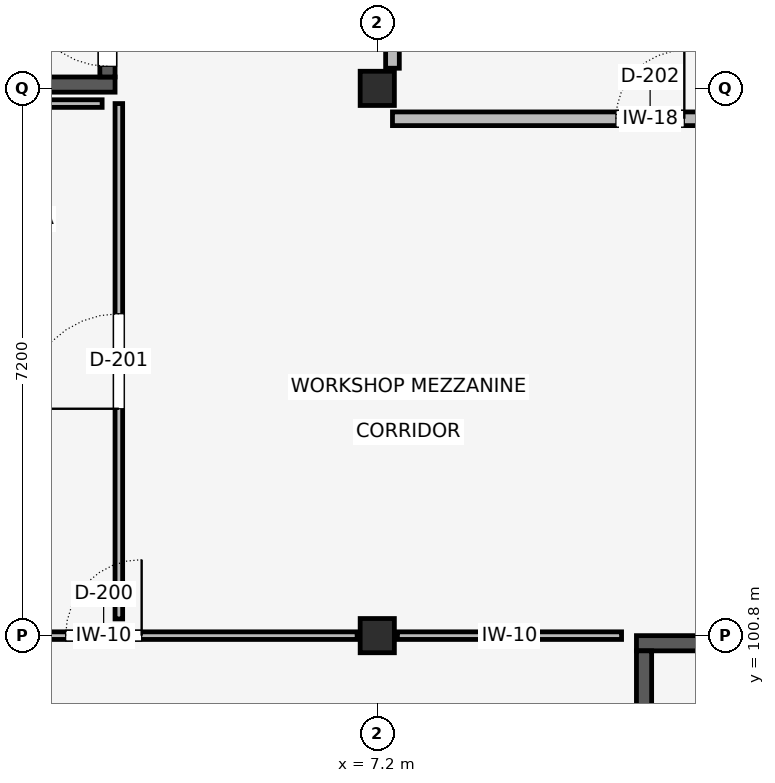
"""IFC4 building model, lengths in metres.
Left out: names, types, materials, properties, quantities, classifications, styles, units other than length and angle.
Written with IfcOpenShell. Run it as: python <this file> out.ifc"""

import sys

from ifc_helpers import new_model, si_unit, direction, frame, frame_2d, origin, origin_2d, place, context, subcontext, project, spatial, rectangle, extrude, element, fill, save


model = new_model("IFC4")
c1 = context("Model", 3, precision=1e-05, world=origin(), true_north=direction((0.0, 1.0)))
c2 = subcontext(c1, "Body", "Model", "MODEL_VIEW")
j1 = project(units=[si_unit("LENGTHUNIT", "METRE"), si_unit("PLANEANGLEUNIT", "RADIAN")], contexts=[c1])
p1 = place(None, origin())
s1 = spatial("IfcSite", under=j1, at=p1, CompositionType="ELEMENT")
p2 = place(p1, origin())
s2 = spatial("IfcBuilding", under=s1, at=p2, CompositionType="ELEMENT")
p3 = place(p2, frame((0.0, 0.0, 5.4)))
s3 = spatial("IfcBuildingStorey", under=s2, at=p3, CompositionType="ELEMENT", Elevation=5.4)
for number, where, z_axis, x_axis in (
    (1, (7.2, 100.8, 0.0), (0.0, 0.0, 1.0), (1.0, 0.0, 0.0)),
    (2, (7.2, 108.0, 0.0), (0.0, 0.0, 1.0), (1.0, 0.0, 0.0)),
):
    element("IfcColumn", number, at=place(p3, frame(where, z_axis=z_axis, x_axis=x_axis)), inside=s3, PredefinedType="COLUMN", context=c2, shape_type="SweptSolid", body=[
        extrude(rectangle(XDim=0.45, YDim=0.45, at=origin_2d()), origin(), (0.0, 0.0, 1.0), 4.2),
    ])
p4 = place(p3, frame((0.225, 108.05, 0.0), z_axis=(0.0, 0.0, 1.0), x_axis=(1.0, 0.0, 0.0)))
e3 = element("IfcWall", 3, at=p4, inside=s3, PredefinedType="SHEAR", context=c2, shape_type="SweptSolid", body=[
    extrude(rectangle(XDim=3.525, YDim=0.2, at=frame_2d((1.762, 0.0))), origin(), (0.0, 0.0, 1.0), 3.95),
])
p5 = place(p3, frame((3.65, 108.15, 0.0), z_axis=(0.0, 0.0, 1.0), x_axis=(0.0, 1.0, 0.0)))
e4 = element("IfcWall", 4, at=p5, inside=s3, PredefinedType="SHEAR", context=c2, shape_type="SweptSolid", body=[
    extrude(rectangle(XDim=6.56, YDim=0.2, at=frame_2d((3.28, 0.0))), origin(), (0.0, 0.0, 1.0), 3.95),
])
p6 = place(p5, frame((0.14, 0.0, 0.0)))
e5 = element("IfcOpeningElement", 5, at=p6, cuts=e4, PredefinedType="OPENING", context=c2, shape_type="SweptSolid", body=[
    extrude(rectangle(XDim=1.1, YDim=2.15, at=frame_2d((0.55, 1.075))), frame((0.0, 0.112, 0.0), z_axis=(0.0, -1.0, 0.0), x_axis=(1.0, 0.0, 0.0)), (0.0, 0.0, 1.0), 0.224),
])
p7 = place(p3, frame((10.61, 100.7, 0.0), z_axis=(0.0, 0.0, 1.0), x_axis=(1.0, 0.0, 0.0)))
e6 = element("IfcWall", 6, at=p7, inside=s3, PredefinedType="SHEAR", context=c2, shape_type="SweptSolid", body=[
    extrude(rectangle(XDim=3.565, YDim=0.2, at=frame_2d((1.782, 0.0))), origin(), (0.0, 0.0, 1.0), 3.95),
])
p8 = place(p7, frame((1.232, 0.0, 0.0)))
e7 = element("IfcOpeningElement", 7, at=p8, cuts=e6, PredefinedType="OPENING", context=c2, shape_type="SweptSolid", body=[
    extrude(rectangle(XDim=1.1, YDim=2.15, at=frame_2d((0.55, 1.075))), frame((0.0, 0.112, 0.0), z_axis=(0.0, -1.0, 0.0), x_axis=(1.0, 0.0, 0.0)), (0.0, 0.0, 1.0), 0.224),
])
p9 = place(p3, frame((10.71, 94.04, 0.0), z_axis=(0.0, 0.0, 1.0), x_axis=(0.0, 1.0, 0.0)))
e8 = element("IfcWall", 8, at=p9, inside=s3, PredefinedType="SHEAR", context=c2, shape_type="SweptSolid", body=[
    extrude(rectangle(XDim=6.56, YDim=0.2, at=frame_2d((3.28, 0.0))), origin(), (0.0, 0.0, 1.0), 3.95),
])
p10 = place(p3, frame((0.265, 100.8, 0.0), z_axis=(0.0, 0.0, 1.0), x_axis=(1.0, 0.0, 0.0)))
e9 = element("IfcWall", 9, at=p10, inside=s3, PredefinedType="PARTITIONING", context=c2, shape_type="SweptSolid", body=[
    extrude(rectangle(XDim=6.67, YDim=0.1, at=frame_2d((3.335, 0.0))), origin(), (0.0, 0.0, 1.0), 3.773),
])
p11 = place(p10, frame((2.835, 0.0, 0.0)))
e10 = element("IfcOpeningElement", 10, at=p11, cuts=e9, PredefinedType="OPENING", context=c2, shape_type="SweptSolid", body=[
    extrude(rectangle(XDim=1.0, YDim=2.15, at=frame_2d((0.5, 1.075))), frame((0.0, 0.062, 0.0), z_axis=(0.0, -1.0, 0.0), x_axis=(1.0, 0.0, 0.0)), (0.0, 0.0, 1.0), 0.124),
])
p12 = place(p3, frame((7.465, 100.8, 0.0), z_axis=(0.0, 0.0, 1.0), x_axis=(1.0, 0.0, 0.0)))
e11 = element("IfcWall", 11, at=p12, inside=s3, PredefinedType="PARTITIONING", context=c2, shape_type="SweptSolid", body=[
    extrude(rectangle(XDim=2.949, YDim=0.1, at=frame_2d((1.475, 0.0))), origin(), (0.0, 0.0, 1.0), 3.92),
])
p13 = place(p3, frame((3.8, 101.02, 0.0), z_axis=(0.0, 0.0, 1.0), x_axis=(0.0, 1.0, 0.0)))
e12 = element("IfcWall", 12, at=p13, inside=s3, PredefinedType="PARTITIONING", context=c2, shape_type="SweptSolid", body=[
    extrude(rectangle(XDim=6.78, YDim=0.1, at=frame_2d((3.39, 0.0))), origin(), (0.0, 0.0, 1.0), 3.92),
])
p14 = place(p13, frame((2.765, 0.0, 0.0)))
e13 = element("IfcOpeningElement", 13, at=p14, cuts=e12, PredefinedType="OPENING", context=c2, shape_type="SweptSolid", body=[
    extrude(rectangle(XDim=1.25, YDim=2.15, at=frame_2d((0.625, 1.075))), frame((0.0, 0.062, 0.0), z_axis=(0.0, -1.0, 0.0), x_axis=(1.0, 0.0, 0.0)), (0.0, 0.0, 1.0), 0.124),
])
p15 = place(p3, frame((0.265, 107.8, 0.0), z_axis=(0.0, 0.0, 1.0), x_axis=(1.0, 0.0, 0.0)))
e14 = element("IfcWall", 14, at=p15, inside=s3, PredefinedType="PARTITIONING", context=c2, shape_type="SweptSolid", body=[
    extrude(rectangle(XDim=3.315, YDim=0.1, at=frame_2d((1.658, 0.0))), origin(), (0.0, 0.0, 1.0), 3.92),
])
p16 = place(p3, frame((7.4, 107.6, 0.0), z_axis=(0.0, 0.0, 1.0), x_axis=(1.0, 0.0, 0.0)))
e15 = element("IfcWall", 15, at=p16, inside=s3, PredefinedType="PLUMBINGWALL", context=c2, shape_type="SweptSolid", body=[
    extrude(rectangle(XDim=6.78, YDim=0.18, at=frame_2d((3.39, 0.0))), origin(), (0.0, 0.0, 1.0), 3.92),
])
p17 = place(p16, frame((2.94, 0.0, 0.0)))
e16 = element("IfcOpeningElement", 16, at=p17, cuts=e15, PredefinedType="OPENING", context=c2, shape_type="SweptSolid", body=[
    extrude(rectangle(XDim=0.9, YDim=2.1, at=frame_2d((0.45, 1.05))), frame((0.0, 0.102, 0.0), z_axis=(0.0, -1.0, 0.0), x_axis=(1.0, 0.0, 0.0)), (0.0, 0.0, 1.0), 0.204),
])
p18 = place(p3, frame((7.4, 108.265, 0.0), z_axis=(0.0, 0.0, 1.0), x_axis=(0.0, 1.0, 0.0)))
e17 = element("IfcWall", 17, at=p18, inside=s3, PredefinedType="PLUMBINGWALL", context=c2, shape_type="SweptSolid", body=[
    extrude(rectangle(XDim=6.67, YDim=0.18, at=frame_2d((3.335, 0.0))), origin(), (0.0, 0.0, 1.0), 3.771),
])
p19 = place(p6, origin())
e18 = element("IfcDoor", 18, at=p19, inside=s3, OperationType="SINGLE_SWING_RIGHT", PredefinedType="DOOR", context=c2, shape_type="SweptSolid", body=[
    extrude(rectangle(XDim=1.1, YDim=2.15, at=frame_2d((0.55, 1.075))), frame((0.0, 0.025, 0.0), z_axis=(0.0, -1.0, 0.0), x_axis=(1.0, 0.0, 0.0)), (0.0, 0.0, 1.0), 0.05),
])
fill(e5, e18)
p20 = place(p11, origin())
e19 = element("IfcDoor", 19, at=p20, inside=s3, OperationType="SINGLE_SWING_RIGHT", PredefinedType="DOOR", context=c2, shape_type="SweptSolid", body=[
    extrude(rectangle(XDim=1.0, YDim=2.15, at=frame_2d((0.5, 1.075))), frame((0.0, 0.025, 0.0), z_axis=(0.0, -1.0, 0.0), x_axis=(1.0, 0.0, 0.0)), (0.0, 0.0, 1.0), 0.05),
])
fill(e10, e19)
p21 = place(p14, origin())
e20 = element("IfcDoor", 20, at=p21, inside=s3, OperationType="SINGLE_SWING_LEFT", PredefinedType="DOOR", context=c2, shape_type="SweptSolid", body=[
    extrude(rectangle(XDim=1.25, YDim=2.15, at=frame_2d((0.625, 1.075))), frame((0.0, 0.025, 0.0), z_axis=(0.0, -1.0, 0.0), x_axis=(1.0, 0.0, 0.0)), (0.0, 0.0, 1.0), 0.05),
])
fill(e13, e20)
p22 = place(p17, origin())
e21 = element("IfcDoor", 21, at=p22, inside=s3, OperationType="SINGLE_SWING_RIGHT", PredefinedType="DOOR", context=c2, shape_type="SweptSolid", body=[
    extrude(rectangle(XDim=0.9, YDim=2.1, at=frame_2d((0.45, 1.05))), frame((0.0, 0.025, 0.0), z_axis=(0.0, -1.0, 0.0), x_axis=(1.0, 0.0, 0.0)), (0.0, 0.0, 1.0), 0.05),
])
fill(e16, e21)
save(model, sys.argv[1])
